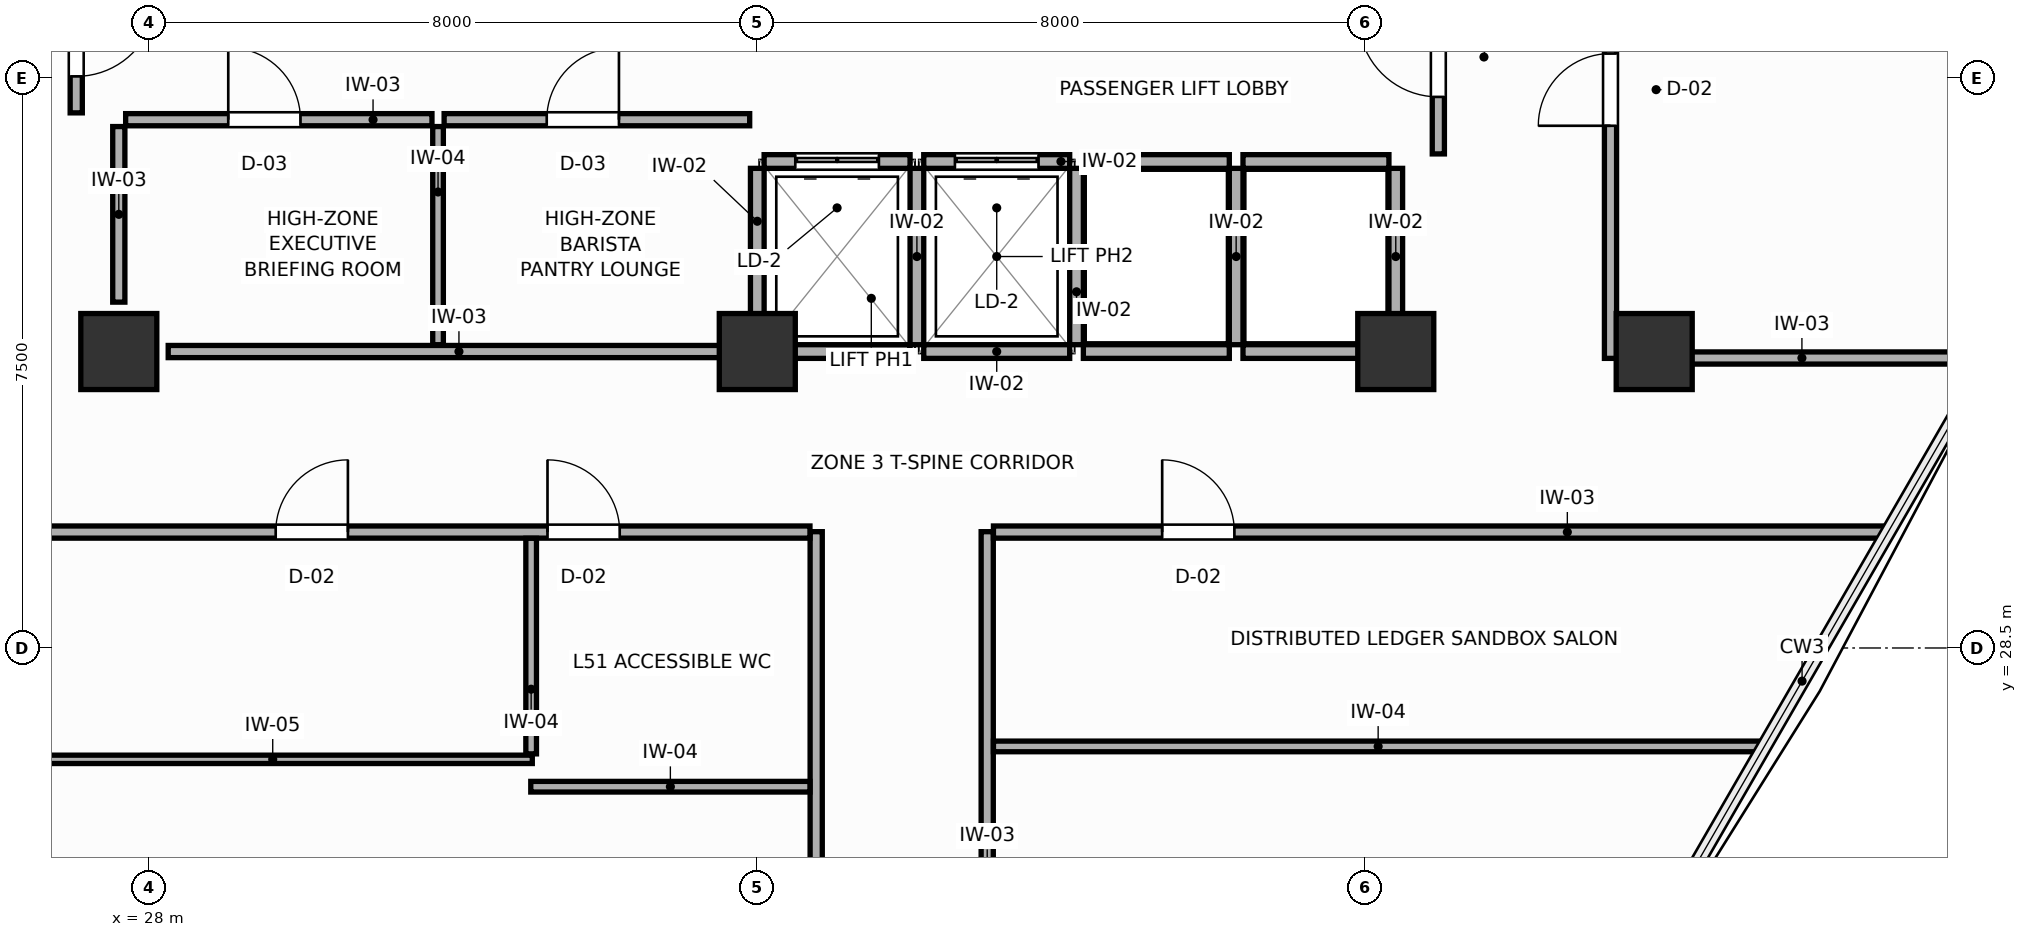
"""IFC4 building model, lengths in metres.
Left out: names, types, materials, properties, quantities, classifications, styles, units other than length and angle.
Written with IfcOpenShell. Run it as: python <this file> out.ifc"""

import sys

from ifc_helpers import new_model, si_unit, direction, frame, frame_2d, origin, origin_2d, place, context, subcontext, project, spatial, rectangle, extrude, source, transform, mapped, element, fill, save


model = new_model("IFC4")
c1 = context("Model", 3, precision=1e-05, world=origin(), true_north=direction((0.0, 1.0)))
c2 = subcontext(c1, "Body", "Model", "MODEL_VIEW")
j1 = project(units=[si_unit("LENGTHUNIT", "METRE"), si_unit("PLANEANGLEUNIT", "RADIAN")], contexts=[c1])
p1 = place(None, origin())
s1 = spatial("IfcSite", under=j1, at=p1, CompositionType="ELEMENT")
p2 = place(p1, origin())
s2 = spatial("IfcBuilding", under=s1, at=p2, CompositionType="ELEMENT")
p3 = place(p2, frame((0.0, 0.0, 197.4)))
s3 = spatial("IfcBuildingStorey", under=s2, at=p3, CompositionType="ELEMENT", Elevation=197.4)
m1 = source(origin(), c2, "Body", "SweptSolid", [
    extrude(rectangle(XDim=1.0, YDim=1.0, at=origin_2d()), origin(), (0.0, 0.0, 1.0), 3.6),
])
for number, where, z_axis, x_axis in (
    (1, (27.6, 32.4, 0.0), (0.0, 0.0, 1.0), (1.0, 0.0, 0.0)),
    (2, (44.4, 32.4, 0.0), (0.0, 0.0, 1.0), (1.0, 0.0, 0.0)),
    (3, (36.0, 32.4, 0.0), (0.0, 0.0, 1.0), (1.0, 0.0, 0.0)),
    (4, (47.8, 32.4, 0.0), (0.0, 0.0, 1.0), (1.0, 0.0, 0.0)),
):
    element("IfcColumn", number, at=place(p3, frame(where, z_axis=z_axis, x_axis=x_axis)), inside=s3, PredefinedType="COLUMN", context=c2, shape_type="MappedRepresentation", body=[
        mapped(m1, transform((0.0, 0.0, 0.0), scale=1.0)),
    ])
p4 = place(p3, frame((36.09, 34.9, 0.0), z_axis=(0.0, 0.0, 1.0), x_axis=(1.0, 0.0, 0.0)))
e5 = element("IfcWall", 5, at=p4, inside=s3, PredefinedType="PARTITIONING", context=c2, shape_type="SweptSolid", body=[
    extrude(rectangle(XDim=1.92, YDim=0.18, at=frame_2d((0.96, 0.0))), origin(), (0.0, 0.0, 1.0), 3.26),
])
p5 = place(p4, frame((0.41, 0.0, 0.0)))
e6 = element("IfcOpeningElement", 6, at=p5, cuts=e5, PredefinedType="OPENING", context=c2, shape_type="SweptSolid", body=[
    extrude(rectangle(XDim=1.1, YDim=2.1, at=frame_2d((0.55, 1.05))), frame((0.0, 0.1, 0.0), z_axis=(0.0, -1.0, 0.0), x_axis=(1.0, 0.0, 0.0)), (0.0, 0.0, 1.0), 0.2),
])
p6 = place(p3, frame((36.09, 32.4, 0.0), z_axis=(0.0, 0.0, 1.0), x_axis=(1.0, 0.0, 0.0)))
e7 = element("IfcWall", 7, at=p6, inside=s3, PredefinedType="PARTITIONING", context=c2, shape_type="SweptSolid", body=[
    extrude(rectangle(XDim=1.92, YDim=0.18, at=frame_2d((0.96, 0.0))), origin(), (0.0, 0.0, 1.0), 2.81),
])
p7 = place(p3, frame((36.0, 32.49, 0.0), z_axis=(0.0, 0.0, 1.0), x_axis=(0.0, 1.0, 0.0)))
e8 = element("IfcWall", 8, at=p7, inside=s3, PredefinedType="PARTITIONING", context=c2, shape_type="SweptSolid", body=[
    extrude(rectangle(XDim=2.32, YDim=0.18, at=frame_2d((1.16, 0.0))), origin(), (0.0, 0.0, 1.0), 3.26),
])
p8 = place(p3, frame((38.19, 34.9, 0.0), z_axis=(0.0, 0.0, 1.0), x_axis=(1.0, 0.0, 0.0)))
e9 = element("IfcWall", 9, at=p8, inside=s3, PredefinedType="PARTITIONING", context=c2, shape_type="SweptSolid", body=[
    extrude(rectangle(XDim=1.92, YDim=0.18, at=frame_2d((0.96, 0.0))), origin(), (0.0, 0.0, 1.0), 3.26),
])
p9 = place(p8, frame((0.41, 0.0, 0.0)))
e10 = element("IfcOpeningElement", 10, at=p9, cuts=e9, PredefinedType="OPENING", context=c2, shape_type="SweptSolid", body=[
    extrude(rectangle(XDim=1.1, YDim=2.1, at=frame_2d((0.55, 1.05))), frame((0.0, 0.1, 0.0), z_axis=(0.0, -1.0, 0.0), x_axis=(1.0, 0.0, 0.0)), (0.0, 0.0, 1.0), 0.2),
])
p10 = place(p3, frame((38.19, 32.4, 0.0), z_axis=(0.0, 0.0, 1.0), x_axis=(1.0, 0.0, 0.0)))
e11 = element("IfcWall", 11, at=p10, inside=s3, PredefinedType="PARTITIONING", context=c2, shape_type="SweptSolid", body=[
    extrude(rectangle(XDim=1.92, YDim=0.18, at=frame_2d((0.96, 0.0))), origin(), (0.0, 0.0, 1.0), 2.81),
])
p11 = place(p3, frame((38.1, 32.49, 0.0), z_axis=(0.0, 0.0, 1.0), x_axis=(0.0, 1.0, 0.0)))
e12 = element("IfcWall", 12, at=p11, inside=s3, PredefinedType="PARTITIONING", context=c2, shape_type="SweptSolid", body=[
    extrude(rectangle(XDim=2.32, YDim=0.18, at=frame_2d((1.16, 0.0))), origin(), (0.0, 0.0, 1.0), 3.26),
])
p12 = place(p3, frame((40.29, 34.9, 0.0), z_axis=(0.0, 0.0, 1.0), x_axis=(1.0, 0.0, 0.0)))
e13 = element("IfcWall", 13, at=p12, inside=s3, PredefinedType="PARTITIONING", context=c2, shape_type="SweptSolid", body=[
    extrude(rectangle(XDim=1.92, YDim=0.18, at=frame_2d((0.96, 0.0))), origin(), (0.0, 0.0, 1.0), 3.26),
])
p13 = place(p3, frame((40.29, 32.4, 0.0), z_axis=(0.0, 0.0, 1.0), x_axis=(1.0, 0.0, 0.0)))
e14 = element("IfcWall", 14, at=p13, inside=s3, PredefinedType="PARTITIONING", context=c2, shape_type="SweptSolid", body=[
    extrude(rectangle(XDim=1.92, YDim=0.18, at=frame_2d((0.96, 0.0))), origin(), (0.0, 0.0, 1.0), 2.81),
])
p14 = place(p3, frame((40.2, 32.49, 0.0), z_axis=(0.0, 0.0, 1.0), x_axis=(0.0, 1.0, 0.0)))
e15 = element("IfcWall", 15, at=p14, inside=s3, PredefinedType="PARTITIONING", context=c2, shape_type="SweptSolid", body=[
    extrude(rectangle(XDim=2.32, YDim=0.18, at=frame_2d((1.16, 0.0))), origin(), (0.0, 0.0, 1.0), 3.26),
])
p15 = place(p3, frame((42.39, 34.9, 0.0), z_axis=(0.0, 0.0, 1.0), x_axis=(1.0, 0.0, 0.0)))
e16 = element("IfcWall", 16, at=p15, inside=s3, PredefinedType="PARTITIONING", context=c2, shape_type="SweptSolid", body=[
    extrude(rectangle(XDim=1.92, YDim=0.18, at=frame_2d((0.96, 0.0))), origin(), (0.0, 0.0, 1.0), 3.26),
])
p16 = place(p3, frame((42.39, 32.4, 0.0), z_axis=(0.0, 0.0, 1.0), x_axis=(1.0, 0.0, 0.0)))
e17 = element("IfcWall", 17, at=p16, inside=s3, PredefinedType="PARTITIONING", context=c2, shape_type="SweptSolid", body=[
    extrude(rectangle(XDim=1.92, YDim=0.18, at=frame_2d((0.96, 0.0))), origin(), (0.0, 0.0, 1.0), 2.81),
])
for number, where, z_axis, x_axis in (
    (18, (42.3, 32.49, 0.0), (0.0, 0.0, 1.0), (0.0, 1.0, 0.0)),
    (19, (44.4, 32.49, 0.0), (0.0, 0.0, 1.0), (0.0, 1.0, 0.0)),
):
    element("IfcWall", number, at=place(p3, frame(where, z_axis=z_axis, x_axis=x_axis)), inside=s3, PredefinedType="PARTITIONING", context=c2, shape_type="SweptSolid", body=[
        extrude(rectangle(XDim=2.32, YDim=0.18, at=frame_2d((1.16, 0.0))), origin(), (0.0, 0.0, 1.0), 3.26),
    ])
p17 = place(p3, frame((28.25, 32.4, 0.0), z_axis=(0.0, 0.0, 1.0), x_axis=(1.0, 0.0, 0.0)))
e20 = element("IfcWall", 20, at=p17, inside=s3, PredefinedType="PARTITIONING", context=c2, shape_type="SweptSolid", body=[
    extrude(rectangle(XDim=7.65, YDim=0.16, at=frame_2d((3.825, 0.0))), origin(), (0.0, 0.0, 1.0), 2.81),
])
p18 = place(p3, frame((27.6, 33.05, 0.0), z_axis=(0.0, 0.0, 1.0), x_axis=(0.0, 1.0, 0.0)))
e21 = element("IfcWall", 21, at=p18, inside=s3, PredefinedType="PARTITIONING", context=c2, shape_type="SweptSolid", body=[
    extrude(rectangle(XDim=2.31, YDim=0.16, at=frame_2d((1.155, 0.0))), origin(), (0.0, 0.0, 1.0), 3.26),
])
p19 = place(p3, frame((31.8, 32.49, 0.0), z_axis=(0.0, 0.0, 1.0), x_axis=(0.0, 1.0, 0.0)))
e22 = element("IfcWall", 22, at=p19, inside=s3, PredefinedType="PARTITIONING", context=c2, shape_type="SweptSolid", body=[
    extrude(rectangle(XDim=2.87, YDim=0.14, at=frame_2d((1.435, 0.0))), origin(), (0.0, 0.0, 1.0), 3.26),
])
p20 = place(p3, frame((27.69, 35.45, 0.0), z_axis=(0.0, 0.0, 1.0), x_axis=(1.0, 0.0, 0.0)))
e23 = element("IfcWall", 23, at=p20, inside=s3, PredefinedType="PARTITIONING", context=c2, shape_type="SweptSolid", body=[
    extrude(rectangle(XDim=4.03, YDim=0.16, at=frame_2d((2.015, 0.0))), origin(), (0.0, 0.0, 1.0), 3.26),
])
p21 = place(p20, frame((1.35, 0.0, 0.0)))
e24 = element("IfcOpeningElement", 24, at=p21, cuts=e23, PredefinedType="OPENING", context=c2, shape_type="SweptSolid", body=[
    extrude(rectangle(XDim=0.95, YDim=2.05, at=frame_2d((0.475, 1.025))), frame((0.0, 0.09, 0.0), z_axis=(0.0, -1.0, 0.0), x_axis=(1.0, 0.0, 0.0)), (0.0, 0.0, 1.0), 0.18),
])
p22 = place(p3, frame((31.88, 35.45, 0.0), z_axis=(0.0, 0.0, 1.0), x_axis=(1.0, 0.0, 0.0)))
e25 = element("IfcWall", 25, at=p22, inside=s3, PredefinedType="PARTITIONING", context=c2, shape_type="SweptSolid", body=[
    extrude(rectangle(XDim=4.02, YDim=0.16, at=frame_2d((2.01, 0.0))), origin(), (0.0, 0.0, 1.0), 3.26),
])
p23 = place(p22, frame((1.35, 0.0, 0.0)))
e26 = element("IfcOpeningElement", 26, at=p23, cuts=e25, PredefinedType="OPENING", context=c2, shape_type="SweptSolid", body=[
    extrude(rectangle(XDim=0.95, YDim=2.05, at=frame_2d((0.475, 1.025))), frame((0.0, 0.09, 0.0), z_axis=(0.0, -1.0, 0.0), x_axis=(1.0, 0.0, 0.0)), (0.0, 0.0, 1.0), 0.18),
])
p24 = place(p3, frame((27.04, 35.54, 0.0), z_axis=(0.0, 0.0, 1.0), x_axis=(0.0, 1.0, 0.0)))
e27 = element("IfcWall", 27, at=p24, inside=s3, PredefinedType="PARTITIONING", context=c2, shape_type="SweptSolid", body=[
    extrude(rectangle(XDim=2.11, YDim=0.16, at=frame_2d((1.055, 0.0))), origin(), (0.0, 0.0, 1.0), 3.26),
])
p25 = place(p24, frame((0.48, 0.0, 0.0)))
e28 = element("IfcOpeningElement", 28, at=p25, cuts=e27, PredefinedType="OPENING", context=c2, shape_type="SweptSolid", body=[
    extrude(rectangle(XDim=1.05, YDim=2.1, at=frame_2d((0.525, 1.05))), frame((0.0, 0.09, 0.0), z_axis=(0.0, -1.0, 0.0), x_axis=(1.0, 0.0, 0.0)), (0.0, 0.0, 1.0), 0.18),
])
p26 = place(p3, frame((44.96, 35.0, 0.0), z_axis=(0.0, 0.0, 1.0), x_axis=(0.0, 1.0, 0.0)))
e29 = element("IfcWall", 29, at=p26, inside=s3, PredefinedType="PARTITIONING", context=c2, shape_type="SweptSolid", body=[
    extrude(rectangle(XDim=2.65, YDim=0.16, at=frame_2d((1.325, 0.0))), origin(), (0.0, 0.0, 1.0), 3.26),
])
p27 = place(p26, frame((0.75, 0.0, 0.0)))
e30 = element("IfcOpeningElement", 30, at=p27, cuts=e29, PredefinedType="OPENING", context=c2, shape_type="SweptSolid", body=[
    extrude(rectangle(XDim=1.05, YDim=2.1, at=frame_2d((0.525, 1.05))), frame((0.0, 0.09, 0.0), z_axis=(0.0, -1.0, 0.0), x_axis=(1.0, 0.0, 0.0)), (0.0, 0.0, 1.0), 0.18),
])
p28 = place(p3, frame((47.225, 32.31, 0.0), z_axis=(0.0, 0.0, 1.0), x_axis=(0.0, 1.0, 0.0)))
e31 = element("IfcWall", 31, at=p28, inside=s3, PredefinedType="PARTITIONING", context=c2, shape_type="SweptSolid", body=[
    extrude(rectangle(XDim=18.753, YDim=0.16, at=frame_2d((9.376, 0.0))), origin(), (0.0, 0.0, 1.0), 3.26),
])
p29 = place(p28, frame((3.06, 0.0, 0.0)))
e32 = element("IfcOpeningElement", 32, at=p29, cuts=e31, PredefinedType="OPENING", context=c2, shape_type="SweptSolid", body=[
    extrude(rectangle(XDim=0.95, YDim=2.05, at=frame_2d((0.475, 1.025))), frame((0.0, 0.09, 0.0), z_axis=(0.0, -1.0, 0.0), x_axis=(1.0, 0.0, 0.0)), (0.0, 0.0, 1.0), 0.18),
])
p30 = place(p28, frame((11.593, 0.0, 0.0)))
e33 = element("IfcOpeningElement", 33, at=p30, cuts=e31, PredefinedType="OPENING", context=c2, shape_type="SweptSolid", body=[
    extrude(rectangle(XDim=0.95, YDim=2.05, at=frame_2d((0.475, 1.025))), frame((0.0, 0.09, 0.0), z_axis=(0.0, -1.0, 0.0), x_axis=(1.0, 0.0, 0.0)), (0.0, 0.0, 1.0), 0.18),
])
p31 = place(p3, frame((36.775, 11.485, 0.0), z_axis=(0.0, 0.0, 1.0), x_axis=(0.0, 1.0, 0.0)))
e34 = element("IfcWall", 34, at=p31, inside=s3, PredefinedType="PARTITIONING", context=c2, shape_type="SweptSolid", body=[
    extrude(rectangle(XDim=18.545, YDim=0.16, at=frame_2d((9.272, 0.0))), origin(), (0.0, 0.0, 1.0), 2.81),
])
p32 = place(p31, frame((5.249, 0.0, 0.0)))
e35 = element("IfcOpeningElement", 35, at=p32, cuts=e34, PredefinedType="OPENING", context=c2, shape_type="SweptSolid", body=[
    extrude(rectangle(XDim=0.95, YDim=2.05, at=frame_2d((0.475, 1.025))), frame((0.0, 0.09, 0.0), z_axis=(0.0, -1.0, 0.0), x_axis=(1.0, 0.0, 0.0)), (0.0, 0.0, 1.0), 0.18),
])
p33 = place(p3, frame((39.025, 13.29, 0.0), z_axis=(0.0, 0.0, 1.0), x_axis=(0.0, 1.0, 0.0)))
e36 = element("IfcWall", 36, at=p33, inside=s3, PredefinedType="PARTITIONING", context=c2, shape_type="SweptSolid", body=[
    extrude(rectangle(XDim=16.74, YDim=0.16, at=frame_2d((8.37, 0.0))), origin(), (0.0, 0.0, 1.0), 3.26),
])
p34 = place(p33, frame((6.716, 0.0, 0.0)))
e37 = element("IfcOpeningElement", 37, at=p34, cuts=e36, PredefinedType="OPENING", context=c2, shape_type="SweptSolid", body=[
    extrude(rectangle(XDim=0.95, YDim=2.05, at=frame_2d((0.475, 1.025))), frame((0.0, 0.09, 0.0), z_axis=(0.0, -1.0, 0.0), x_axis=(1.0, 0.0, 0.0)), (0.0, 0.0, 1.0), 0.18),
])
p35 = place(p3, frame((21.143, 30.025, 0.0), z_axis=(0.0, 0.0, 1.0), x_axis=(1.0, 0.0, 0.0)))
e38 = element("IfcWall", 38, at=p35, inside=s3, PredefinedType="PARTITIONING", context=c2, shape_type="SweptSolid", body=[
    extrude(rectangle(XDim=15.551, YDim=0.16, at=frame_2d((7.775, 0.0))), origin(), (0.0, 0.0, 1.0), 3.26),
])
p36 = place(p35, frame((12.097, 0.0, 0.0)))
e39 = element("IfcOpeningElement", 39, at=p36, cuts=e38, PredefinedType="OPENING", context=c2, shape_type="SweptSolid", body=[
    extrude(rectangle(XDim=0.95, YDim=2.05, at=frame_2d((0.475, 1.025))), frame((0.0, 0.09, 0.0), z_axis=(0.0, -1.0, 0.0), x_axis=(1.0, 0.0, 0.0)), (0.0, 0.0, 1.0), 0.18),
])
p37 = place(p35, frame((8.521, 0.0, 0.0)))
e40 = element("IfcOpeningElement", 40, at=p37, cuts=e38, PredefinedType="OPENING", context=c2, shape_type="SweptSolid", body=[
    extrude(rectangle(XDim=0.95, YDim=2.05, at=frame_2d((0.475, 1.025))), frame((0.0, 0.09, 0.0), z_axis=(0.0, -1.0, 0.0), x_axis=(1.0, 0.0, 0.0)), (0.0, 0.0, 1.0), 0.18),
])
p38 = place(p3, frame((39.107, 30.025, 0.0), z_axis=(0.0, 0.0, 1.0), x_axis=(1.0, 0.0, 0.0)))
e41 = element("IfcWall", 41, at=p38, inside=s3, PredefinedType="PARTITIONING", context=c2, shape_type="SweptSolid", body=[
    extrude(rectangle(XDim=11.75, YDim=0.16, at=frame_2d((5.875, 0.0))), origin(), (0.0, 0.0, 1.0), 3.26),
])
p39 = place(p38, frame((2.22, 0.0, 0.0)))
e42 = element("IfcOpeningElement", 42, at=p39, cuts=e41, PredefinedType="OPENING", context=c2, shape_type="SweptSolid", body=[
    extrude(rectangle(XDim=0.95, YDim=2.05, at=frame_2d((0.475, 1.025))), frame((0.0, 0.09, 0.0), z_axis=(0.0, -1.0, 0.0), x_axis=(1.0, 0.0, 0.0)), (0.0, 0.0, 1.0), 0.18),
])
p40 = place(p3, frame((47.307, 32.315, 0.0), z_axis=(0.0, 0.0, 1.0), x_axis=(1.0, 0.0, 0.0)))
e43 = element("IfcWall", 43, at=p40, inside=s3, PredefinedType="PARTITIONING", context=c2, shape_type="SweptSolid", body=[
    extrude(rectangle(XDim=4.873, YDim=0.16, at=frame_2d((2.437, 0.0))), origin(), (0.0, 0.0, 1.0), 2.81),
])
p41 = place(p3, frame((39.107, 27.205, 0.0), z_axis=(0.0, 0.0, 1.0), x_axis=(1.0, 0.0, 0.0)))
e44 = element("IfcWall", 44, at=p41, inside=s3, PredefinedType="PARTITIONING", context=c2, shape_type="SweptSolid", body=[
    extrude(rectangle(XDim=10.122, YDim=0.14, at=frame_2d((5.061, 0.0))), origin(), (0.0, 0.0, 1.0), 3.26),
])
p42 = place(p3, frame((26.21, 27.035, 0.0), z_axis=(0.0, 0.0, 1.0), x_axis=(1.0, 0.0, 0.0)))
e45 = element("IfcWall", 45, at=p42, inside=s3, PredefinedType="MOVABLE", context=c2, shape_type="SweptSolid", body=[
    extrude(rectangle(XDim=6.83, YDim=0.11, at=frame_2d((3.415, 0.0))), origin(), (0.0, 0.0, 1.0), 3.26),
])
p43 = place(p3, frame((33.02, 26.675, 0.0), z_axis=(0.0, 0.0, 1.0), x_axis=(1.0, 0.0, 0.0)))
e46 = element("IfcWall", 46, at=p43, inside=s3, PredefinedType="PARTITIONING", context=c2, shape_type="SweptSolid", body=[
    extrude(rectangle(XDim=3.673, YDim=0.14, at=frame_2d((1.836, 0.0))), origin(), (0.0, 0.0, 1.0), 3.26),
])
p44 = place(p3, frame((33.025, 27.107, 0.0), z_axis=(0.0, 0.0, 1.0), x_axis=(0.0, 1.0, 0.0)))
e47 = element("IfcWall", 47, at=p44, inside=s3, PredefinedType="PARTITIONING", context=c2, shape_type="SweptSolid", body=[
    extrude(rectangle(XDim=2.836, YDim=0.14, at=frame_2d((1.418, 0.0))), origin(), (0.0, 0.0, 1.0), 3.26),
])
p45 = place(p5, origin())
e48 = element("IfcDoor", 48, at=p45, inside=s3, OperationType="DOUBLE_DOOR_SLIDING", PredefinedType="DOOR", context=c2, shape_type="SweptSolid", body=[
    extrude(rectangle(XDim=1.1, YDim=2.1, at=frame_2d((0.55, 1.05))), frame((0.0, 0.025, 0.0), z_axis=(0.0, -1.0, 0.0), x_axis=(1.0, 0.0, 0.0)), (0.0, 0.0, 1.0), 0.05),
])
fill(e6, e48)
p46 = place(p9, origin())
e49 = element("IfcDoor", 49, at=p46, inside=s3, OperationType="DOUBLE_DOOR_SLIDING", PredefinedType="DOOR", context=c2, shape_type="SweptSolid", body=[
    extrude(rectangle(XDim=1.1, YDim=2.1, at=frame_2d((0.55, 1.05))), frame((0.0, 0.025, 0.0), z_axis=(0.0, -1.0, 0.0), x_axis=(1.0, 0.0, 0.0)), (0.0, 0.0, 1.0), 0.05),
])
fill(e10, e49)
p47 = place(p21, origin())
e50 = element("IfcDoor", 50, at=p47, inside=s3, OperationType="SINGLE_SWING_LEFT", PredefinedType="DOOR", context=c2, shape_type="SweptSolid", body=[
    extrude(rectangle(XDim=0.95, YDim=2.05, at=frame_2d((0.475, 1.025))), frame((0.0, 0.025, 0.0), z_axis=(0.0, -1.0, 0.0), x_axis=(1.0, 0.0, 0.0)), (0.0, 0.0, 1.0), 0.05),
])
fill(e24, e50)
p48 = place(p23, origin())
e51 = element("IfcDoor", 51, at=p48, inside=s3, OperationType="SINGLE_SWING_RIGHT", PredefinedType="DOOR", context=c2, shape_type="SweptSolid", body=[
    extrude(rectangle(XDim=0.95, YDim=2.05, at=frame_2d((0.475, 1.025))), frame((0.0, 0.025, 0.0), z_axis=(0.0, -1.0, 0.0), x_axis=(1.0, 0.0, 0.0)), (0.0, 0.0, 1.0), 0.05),
])
fill(e26, e51)
p49 = place(p25, frame((1.05, 0.0, 0.0), z_axis=(0.0, 0.0, 1.0), x_axis=(-1.0, 0.0, 0.0)))
e52 = element("IfcDoor", 52, at=p49, inside=s3, OperationType="SINGLE_SWING_LEFT", PredefinedType="DOOR", context=c2, shape_type="SweptSolid", body=[
    extrude(rectangle(XDim=1.05, YDim=2.1, at=frame_2d((0.525, 1.05))), frame((0.0, 0.025, 0.0), z_axis=(0.0, -1.0, 0.0), x_axis=(1.0, 0.0, 0.0)), (0.0, 0.0, 1.0), 0.05),
])
fill(e28, e52)
p50 = place(p27, origin())
e53 = element("IfcDoor", 53, at=p50, inside=s3, OperationType="SINGLE_SWING_RIGHT", PredefinedType="DOOR", context=c2, shape_type="SweptSolid", body=[
    extrude(rectangle(XDim=1.05, YDim=2.1, at=frame_2d((0.525, 1.05))), frame((0.0, 0.025, 0.0), z_axis=(0.0, -1.0, 0.0), x_axis=(1.0, 0.0, 0.0)), (0.0, 0.0, 1.0), 0.05),
])
fill(e30, e53)
p51 = place(p29, origin())
e54 = element("IfcDoor", 54, at=p51, inside=s3, OperationType="SINGLE_SWING_LEFT", PredefinedType="DOOR", context=c2, shape_type="SweptSolid", body=[
    extrude(rectangle(XDim=0.95, YDim=2.05, at=frame_2d((0.475, 1.025))), frame((0.0, 0.025, 0.0), z_axis=(0.0, -1.0, 0.0), x_axis=(1.0, 0.0, 0.0)), (0.0, 0.0, 1.0), 0.05),
])
fill(e32, e54)
p52 = place(p36, origin())
e55 = element("IfcDoor", 55, at=p52, inside=s3, OperationType="SINGLE_SWING_LEFT", PredefinedType="DOOR", context=c2, shape_type="SweptSolid", body=[
    extrude(rectangle(XDim=0.95, YDim=2.05, at=frame_2d((0.475, 1.025))), frame((0.0, 0.025, 0.0), z_axis=(0.0, -1.0, 0.0), x_axis=(1.0, 0.0, 0.0)), (0.0, 0.0, 1.0), 0.05),
])
fill(e39, e55)
p53 = place(p37, origin())
e56 = element("IfcDoor", 56, at=p53, inside=s3, OperationType="SINGLE_SWING_RIGHT", PredefinedType="DOOR", context=c2, shape_type="SweptSolid", body=[
    extrude(rectangle(XDim=0.95, YDim=2.05, at=frame_2d((0.475, 1.025))), frame((0.0, 0.025, 0.0), z_axis=(0.0, -1.0, 0.0), x_axis=(1.0, 0.0, 0.0)), (0.0, 0.0, 1.0), 0.05),
])
fill(e40, e56)
p54 = place(p39, origin())
e57 = element("IfcDoor", 57, at=p54, inside=s3, OperationType="SINGLE_SWING_LEFT", PredefinedType="DOOR", context=c2, shape_type="SweptSolid", body=[
    extrude(rectangle(XDim=0.95, YDim=2.05, at=frame_2d((0.475, 1.025))), frame((0.0, 0.025, 0.0), z_axis=(0.0, -1.0, 0.0), x_axis=(1.0, 0.0, 0.0)), (0.0, 0.0, 1.0), 0.05),
])
fill(e42, e57)
save(model, sys.argv[1])
